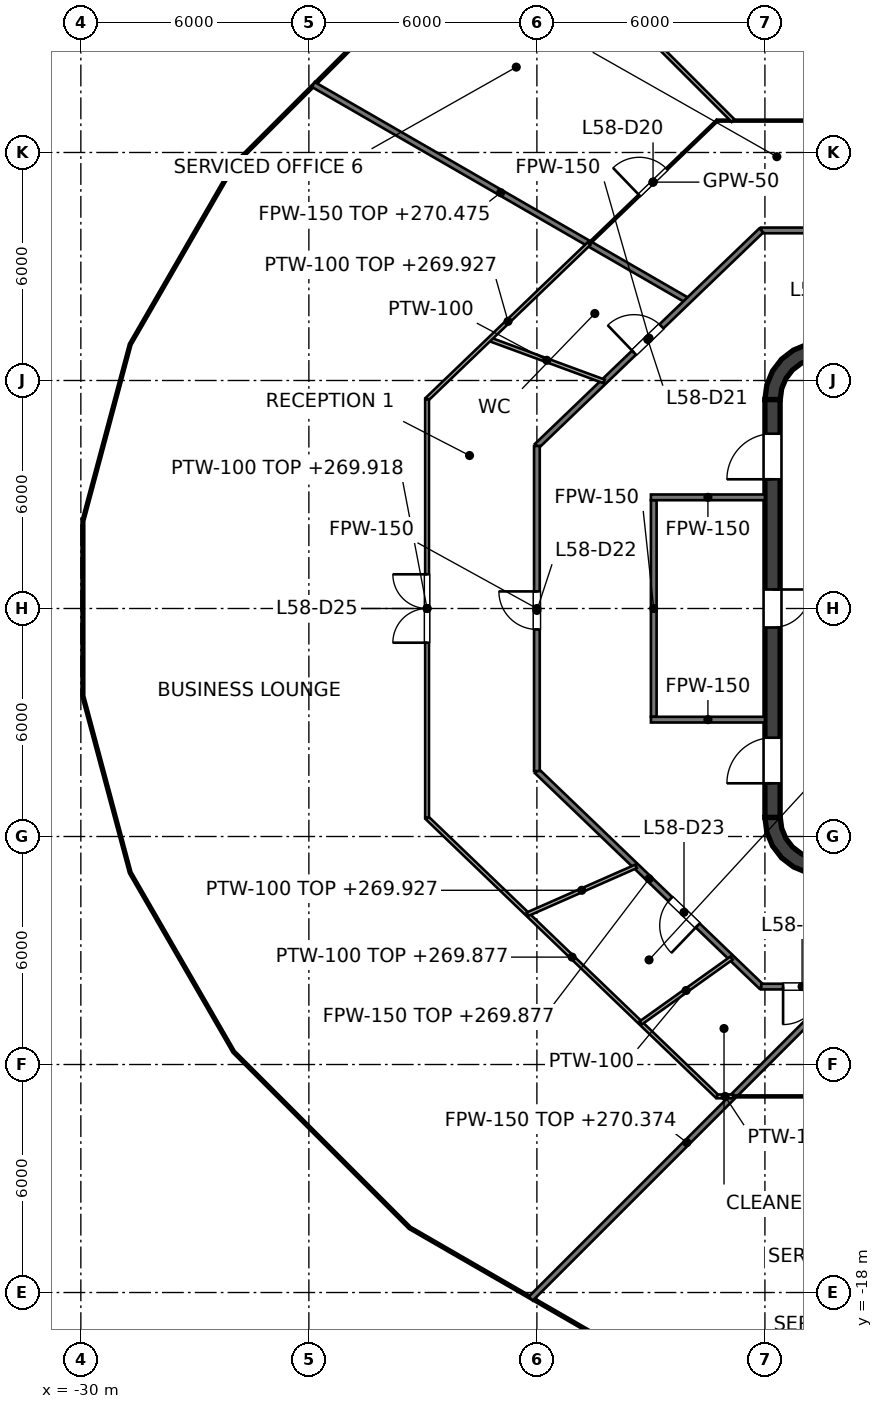
"""IFC4 building model, lengths in metres.
Left out: names, types, materials, properties, quantities, classifications, styles, units other than length and angle.
Written with IfcOpenShell. Run it as: python <this file> out.ifc"""

import sys

from ifc_helpers import new_model, si_unit, direction, frame, frame_2d, origin, place, context, subcontext, project, spatial, polyline, rectangle, outline, extrude, element, fill, save


model = new_model("IFC4")
c1 = context("Model", 3, precision=1e-05, world=origin(), true_north=direction((0.0, 1.0)))
c2 = subcontext(c1, "Body", "Model", "MODEL_VIEW")
j1 = project(units=[si_unit("LENGTHUNIT", "METRE"), si_unit("PLANEANGLEUNIT", "RADIAN")], contexts=[c1])
p1 = place(None, origin())
s1 = spatial("IfcSite", under=j1, at=p1, CompositionType="ELEMENT")
p2 = place(p1, origin())
s2 = spatial("IfcBuilding", under=s1, at=p2, CompositionType="ELEMENT")
p3 = place(p2, frame((0.0, 0.0, 267.0)))
s3 = spatial("IfcBuildingStorey", under=s2, at=p3, CompositionType="ELEMENT", Elevation=267.0)
p4 = place(p3, frame((-11.8, -5.5, 0.0), z_axis=(0.0, 0.0, 1.0), x_axis=(0.0, 1.0, 0.0)))
e1 = element("IfcWall", 1, at=p4, inside=s3, PredefinedType="SHEAR", context=c2, shape_type="SweptSolid", body=[
    extrude(rectangle(XDim=11.0, YDim=0.4, at=frame_2d((5.5, 0.0))), origin(), (0.0, 0.0, 1.0), 4.0),
])
p5 = place(p4, frame((5.0, 0.0, 0.0)))
e2 = element("IfcOpeningElement", 2, at=p5, cuts=e1, PredefinedType="OPENING", context=c2, shape_type="SweptSolid", body=[
    extrude(rectangle(XDim=1.0, YDim=2.1, at=frame_2d((0.5, 1.05))), frame((0.0, 0.2, 0.0), z_axis=(0.0, -1.0, 0.0), x_axis=(1.0, 0.0, 0.0)), (0.0, 0.0, 1.0), 0.4),
])
p6 = place(p4, frame((0.9, 0.0, 0.0)))
e3 = element("IfcOpeningElement", 3, at=p6, cuts=e1, PredefinedType="OPENING", context=c2, shape_type="SweptSolid", body=[
    extrude(rectangle(XDim=1.2, YDim=2.1, at=frame_2d((0.6, 1.05))), frame((0.0, 0.2, 0.0), z_axis=(0.0, -1.0, 0.0), x_axis=(1.0, 0.0, 0.0)), (0.0, 0.0, 1.0), 0.4),
])
p7 = place(p4, frame((8.9, 0.0, 0.0)))
e4 = element("IfcOpeningElement", 4, at=p7, cuts=e1, PredefinedType="OPENING", context=c2, shape_type="SweptSolid", body=[
    extrude(rectangle(XDim=1.2, YDim=2.1, at=frame_2d((0.6, 1.05))), frame((0.0, 0.2, 0.0), z_axis=(0.0, -1.0, 0.0), x_axis=(1.0, 0.0, 0.0)), (0.0, 0.0, 1.0), 0.4),
])
p8 = place(p3, origin())
e5 = element("IfcWall", 5, at=p8, inside=s3, PredefinedType="SHEAR", context=c2, shape_type="SweptSolid", body=[
    extrude(outline(polyline([(-12.0, 5.5), (-11.596, 5.5), (-11.559, 5.784), (-11.45, 6.048), (-11.275, 6.275), (-11.048, 6.45), (-10.784, 6.559), (-10.5, 6.596), (-10.5, 7.0), (-10.888, 6.949), (-11.25, 6.799), (-11.561, 6.561), (-11.799, 6.25), (-11.949, 5.888), (-12.0, 5.5)])), origin(), (0.0, 0.0, 1.0), 4.0),
])
e6 = element("IfcWall", 6, at=p8, inside=s3, PredefinedType="SHEAR", context=c2, shape_type="SweptSolid", body=[
    extrude(outline(polyline([(-10.5, -7.0), (-10.5, -6.596), (-10.784, -6.559), (-11.048, -6.45), (-11.275, -6.275), (-11.45, -6.048), (-11.559, -5.784), (-11.596, -5.5), (-12.0, -5.5), (-11.949, -5.888), (-11.799, -6.25), (-11.561, -6.561), (-11.25, -6.799), (-10.888, -6.949), (-10.5, -7.0)])), origin(), (0.0, 0.0, 1.0), 4.0),
])
p9 = place(p3, frame((-14.925, -2.85, 0.0), z_axis=(0.0, 0.0, 1.0), x_axis=(0.0, 1.0, 0.0)))
e7 = element("IfcWall", 7, at=p9, inside=s3, PredefinedType="PARTITIONING", context=c2, shape_type="SweptSolid", body=[
    extrude(rectangle(XDim=5.7, YDim=0.15, at=frame_2d((2.85, 0.0))), origin(), (0.0, 0.0, 1.0), 2.918),
])
for number, where, z_axis, x_axis in (
    (8, (-15.0, 2.925, 0.0), (0.0, 0.0, 1.0), (1.0, 0.0, 0.0)),
    (9, (-15.0, -2.925, 0.0), (0.0, 0.0, 1.0), (1.0, 0.0, 0.0)),
):
    element("IfcWall", number, at=place(p3, frame(where, z_axis=z_axis, x_axis=x_axis)), inside=s3, PredefinedType="PARTITIONING", context=c2, shape_type="SweptSolid", body=[
        extrude(rectangle(XDim=3.0, YDim=0.15, at=frame_2d((1.5, 0.0))), origin(), (0.0, 0.0, 1.0), 2.918),
    ])
p10 = place(p3, frame((-18.0, -4.278, 0.0), z_axis=(0.0, 0.0, 1.0), x_axis=(0.721290181137, -0.692633001376, 0.0)))
e10 = element("IfcWall", 10, at=p10, inside=s3, PredefinedType="PARTITIONING", context=c2, shape_type="SweptSolid", body=[
    extrude(rectangle(XDim=8.187, YDim=0.15, at=frame_2d((4.094, 0.0))), origin(), (0.0, 0.0, 1.0), 2.877),
])
p11 = place(p10, frame((4.866, 0.0, 0.0)))
e11 = element("IfcOpeningElement", 11, at=p11, cuts=e10, PredefinedType="OPENING", context=c2, shape_type="SweptSolid", body=[
    extrude(rectangle(XDim=1.0, YDim=2.1, at=frame_2d((0.5, 1.05))), frame((0.0, 0.075, 0.0), z_axis=(0.0, -1.0, 0.0), x_axis=(1.0, 0.0, 0.0)), (0.0, 0.0, 1.0), 0.15),
])
p12 = place(p3, frame((-23.883, 13.789, 0.0), z_axis=(0.0, 0.0, 1.0), x_axis=(0.866026665955, -0.499997813851, 0.0)))
e12 = element("IfcWall", 12, at=p12, inside=s3, PredefinedType="PARTITIONING", context=c2, shape_type="SweptSolid", body=[
    extrude(rectangle(XDim=11.384, YDim=0.15, at=frame_2d((5.692, 0.0))), origin(), (0.0, 0.0, 1.0), 3.475),
])
p13 = place(p3, frame((-12.095, -9.949, 0.0), z_axis=(0.0, 0.0, 1.0), x_axis=(1.0, 0.0, 0.0)))
e13 = element("IfcWall", 13, at=p13, inside=s3, PredefinedType="PARTITIONING", context=c2, shape_type="SweptSolid", body=[
    extrude(rectangle(XDim=24.19, YDim=0.15, at=frame_2d((12.095, 0.0))), origin(), (0.0, 0.0, 1.0), 2.877),
])
p14 = place(p13, frame((0.573, 0.0, 0.0)))
e14 = element("IfcOpeningElement", 14, at=p14, cuts=e13, PredefinedType="OPENING", context=c2, shape_type="SweptSolid", body=[
    extrude(rectangle(XDim=1.0, YDim=2.1, at=frame_2d((0.5, 1.05))), frame((0.0, 0.075, 0.0), z_axis=(0.0, -1.0, 0.0), x_axis=(1.0, 0.0, 0.0)), (0.0, 0.0, 1.0), 0.15),
])
p15 = place(p13, frame((5.966, 0.0, 0.0)))
e15 = element("IfcOpeningElement", 15, at=p15, cuts=e13, PredefinedType="OPENING", context=c2, shape_type="SweptSolid", body=[
    extrude(rectangle(XDim=1.0, YDim=2.1, at=frame_2d((0.5, 1.05))), frame((0.0, 0.075, 0.0), z_axis=(0.0, -1.0, 0.0), x_axis=(1.0, 0.0, 0.0)), (0.0, 0.0, 1.0), 0.15),
])
p16 = place(p13, frame((13.812, 0.0, 0.0)))
e16 = element("IfcOpeningElement", 16, at=p16, cuts=e13, PredefinedType="OPENING", context=c2, shape_type="SweptSolid", body=[
    extrude(rectangle(XDim=1.0, YDim=2.1, at=frame_2d((0.5, 1.05))), frame((0.0, 0.075, 0.0), z_axis=(0.0, -1.0, 0.0), x_axis=(1.0, 0.0, 0.0)), (0.0, 0.0, 1.0), 0.15),
])
p17 = place(p13, frame((19.879, 0.0, 0.0)))
e17 = element("IfcOpeningElement", 17, at=p17, cuts=e13, PredefinedType="OPENING", context=c2, shape_type="SweptSolid", body=[
    extrude(rectangle(XDim=1.0, YDim=2.1, at=frame_2d((0.5, 1.05))), frame((0.0, 0.075, 0.0), z_axis=(0.0, -1.0, 0.0), x_axis=(1.0, 0.0, 0.0)), (0.0, 0.0, 1.0), 0.15),
])
p18 = place(p3, frame((-12.095, 9.949, 0.0), z_axis=(0.0, 0.0, 1.0), x_axis=(1.0, 0.0, 0.0)))
e18 = element("IfcWall", 18, at=p18, inside=s3, PredefinedType="PARTITIONING", context=c2, shape_type="SweptSolid", body=[
    extrude(rectangle(XDim=24.19, YDim=0.15, at=frame_2d((12.095, 0.0))), origin(), (0.0, 0.0, 1.0), 2.927),
])
p19 = place(p18, frame((9.784, 0.0, 0.0)))
e19 = element("IfcOpeningElement", 19, at=p19, cuts=e18, PredefinedType="OPENING", context=c2, shape_type="SweptSolid", body=[
    extrude(rectangle(XDim=1.0, YDim=2.1, at=frame_2d((0.5, 1.05))), frame((0.0, 0.075, 0.0), z_axis=(0.0, -1.0, 0.0), x_axis=(1.0, 0.0, 0.0)), (0.0, 0.0, 1.0), 0.15),
])
p20 = place(p18, frame((5.56, 0.0, 0.0)))
e20 = element("IfcOpeningElement", 20, at=p20, cuts=e18, PredefinedType="OPENING", context=c2, shape_type="SweptSolid", body=[
    extrude(rectangle(XDim=1.0, YDim=2.1, at=frame_2d((0.5, 1.05))), frame((0.0, 0.075, 0.0), z_axis=(0.0, -1.0, 0.0), x_axis=(1.0, 0.0, 0.0)), (0.0, 0.0, 1.0), 0.15),
])
p21 = place(p18, frame((1.322, 0.0, 0.0)))
e21 = element("IfcOpeningElement", 21, at=p21, cuts=e18, PredefinedType="OPENING", context=c2, shape_type="SweptSolid", body=[
    extrude(rectangle(XDim=1.0, YDim=2.1, at=frame_2d((0.5, 1.05))), frame((0.0, 0.075, 0.0), z_axis=(0.0, -1.0, 0.0), x_axis=(1.0, 0.0, 0.0)), (0.0, 0.0, 1.0), 0.15),
])
p22 = place(p18, frame((19.104, 0.0, 0.0)))
e22 = element("IfcOpeningElement", 22, at=p22, cuts=e18, PredefinedType="OPENING", context=c2, shape_type="SweptSolid", body=[
    extrude(rectangle(XDim=1.0, YDim=2.1, at=frame_2d((0.5, 1.05))), frame((0.0, 0.075, 0.0), z_axis=(0.0, -1.0, 0.0), x_axis=(1.0, 0.0, 0.0)), (0.0, 0.0, 1.0), 0.15),
])
p23 = place(p18, frame((14.129, 0.0, 0.0)))
e23 = element("IfcOpeningElement", 23, at=p23, cuts=e18, PredefinedType="OPENING", context=c2, shape_type="SweptSolid", body=[
    extrude(rectangle(XDim=1.0, YDim=2.1, at=frame_2d((0.5, 1.05))), frame((0.0, 0.075, 0.0), z_axis=(0.0, -1.0, 0.0), x_axis=(1.0, 0.0, 0.0)), (0.0, 0.0, 1.0), 0.15),
])
p24 = place(p3, frame((-18.0, 4.278, 0.0), z_axis=(0.0, 0.0, 1.0), x_axis=(0.721260976692, 0.69266341285, 0.0)))
e24 = element("IfcWall", 24, at=p24, inside=s3, PredefinedType="PARTITIONING", context=c2, shape_type="SweptSolid", body=[
    extrude(rectangle(XDim=8.187, YDim=0.15, at=frame_2d((4.094, 0.0))), origin(), (0.0, 0.0, 1.0), 2.918),
])
p25 = place(p24, frame((3.544, 0.0, 0.0)))
e25 = element("IfcOpeningElement", 25, at=p25, cuts=e24, PredefinedType="OPENING", context=c2, shape_type="SweptSolid", body=[
    extrude(rectangle(XDim=1.0, YDim=2.1, at=frame_2d((0.5, 1.05))), frame((0.0, 0.075, 0.0), z_axis=(0.0, -1.0, 0.0), x_axis=(1.0, 0.0, 0.0)), (0.0, 0.0, 1.0), 0.15),
])
p26 = place(p3, frame((-18.16, -18.16, 0.0), z_axis=(0.0, 0.0, 1.0), x_axis=(0.707106781187, 0.707106781187, 0.0)))
e26 = element("IfcWall", 26, at=p26, inside=s3, PredefinedType="PARTITIONING", context=c2, shape_type="SweptSolid", body=[
    extrude(rectangle(XDim=11.612, YDim=0.15, at=frame_2d((5.806, 0.0))), origin(), (0.0, 0.0, 1.0), 3.374),
])
p27 = place(p3, frame((-18.0, -4.278, 0.0), z_axis=(0.0, 0.0, 1.0), x_axis=(0.0, 1.0, 0.0)))
e27 = element("IfcWall", 27, at=p27, inside=s3, PredefinedType="PARTITIONING", context=c2, shape_type="SweptSolid", body=[
    extrude(rectangle(XDim=8.556, YDim=0.15, at=frame_2d((4.278, 0.0))), origin(), (0.0, 0.0, 1.0), 2.918),
])
p28 = place(p27, frame((3.728, 0.0, 0.0)))
e28 = element("IfcOpeningElement", 28, at=p28, cuts=e27, PredefinedType="OPENING", context=c2, shape_type="SweptSolid", body=[
    extrude(rectangle(XDim=1.0, YDim=2.1, at=frame_2d((0.5, 1.05))), frame((0.0, 0.075, 0.0), z_axis=(0.0, -1.0, 0.0), x_axis=(1.0, 0.0, 0.0)), (0.0, 0.0, 1.0), 0.15),
])
p29 = place(p3, frame((-12.839, -12.839, 0.0), z_axis=(0.0, 0.0, 1.0), x_axis=(1.0, 0.0, 0.0)))
e29 = element("IfcWall", 29, at=p29, inside=s3, PredefinedType="PARTITIONING", context=c2, shape_type="SweptSolid", body=[
    extrude(rectangle(XDim=20.251, YDim=0.05, at=frame_2d((10.125, 0.0))), origin(), (0.0, 0.0, 1.0), 2.877),
])
p30 = place(p29, frame((4.149, 0.0, 0.0)))
e30 = element("IfcOpeningElement", 30, at=p30, cuts=e29, PredefinedType="OPENING", context=c2, shape_type="SweptSolid", body=[
    extrude(rectangle(XDim=1.0, YDim=2.1, at=frame_2d((0.5, 1.05))), frame((0.0, 0.025, 0.0), z_axis=(0.0, -1.0, 0.0), x_axis=(1.0, 0.0, 0.0)), (0.0, 0.0, 1.0), 0.05),
])
p31 = place(p29, frame((15.15, 0.0, 0.0)))
e31 = element("IfcOpeningElement", 31, at=p31, cuts=e29, PredefinedType="OPENING", context=c2, shape_type="SweptSolid", body=[
    extrude(rectangle(XDim=1.0, YDim=2.1, at=frame_2d((0.5, 1.05))), frame((0.0, 0.025, 0.0), z_axis=(0.0, -1.0, 0.0), x_axis=(1.0, 0.0, 0.0)), (0.0, 0.0, 1.0), 0.05),
])
p32 = place(p3, frame((-13.258, 12.839, 0.0), z_axis=(0.0, 0.0, 1.0), x_axis=(1.0, 0.0, 0.0)))
e32 = element("IfcWall", 32, at=p32, inside=s3, PredefinedType="PARTITIONING", context=c2, shape_type="SweptSolid", body=[
    extrude(rectangle(XDim=13.258, YDim=0.05, at=frame_2d((6.629, 0.0))), origin(), (0.0, 0.0, 1.0), 2.927),
])
p33 = place(p32, frame((11.038, 0.0, 0.0)))
e33 = element("IfcOpeningElement", 33, at=p33, cuts=e32, PredefinedType="OPENING", context=c2, shape_type="SweptSolid", body=[
    extrude(rectangle(XDim=1.0, YDim=2.1, at=frame_2d((0.5, 1.05))), frame((0.0, 0.025, 0.0), z_axis=(0.0, -1.0, 0.0), x_axis=(1.0, 0.0, 0.0)), (0.0, 0.0, 1.0), 0.05),
])
p34 = place(p32, frame((4.985, 0.0, 0.0)))
e34 = element("IfcOpeningElement", 34, at=p34, cuts=e32, PredefinedType="OPENING", context=c2, shape_type="SweptSolid", body=[
    extrude(rectangle(XDim=1.0, YDim=2.1, at=frame_2d((0.5, 1.05))), frame((0.0, 0.025, 0.0), z_axis=(0.0, -1.0, 0.0), x_axis=(1.0, 0.0, 0.0)), (0.0, 0.0, 1.0), 0.05),
])
p35 = place(p3, frame((-16.629, 9.601, 0.0), z_axis=(0.0, 0.0, 1.0), x_axis=(0.721171224294, 0.692756858681, 0.0)))
e35 = element("IfcWall", 35, at=p35, inside=s3, PredefinedType="PARTITIONING", context=c2, shape_type="SweptSolid", body=[
    extrude(rectangle(XDim=4.674, YDim=0.05, at=frame_2d((2.337, 0.0))), origin(), (0.0, 0.0, 1.0), 2.927),
])
p36 = place(p35, frame((1.837, 0.0, 0.0)))
e36 = element("IfcOpeningElement", 36, at=p36, cuts=e35, PredefinedType="OPENING", context=c2, shape_type="SweptSolid", body=[
    extrude(rectangle(XDim=1.0, YDim=2.1, at=frame_2d((0.5, 1.05))), frame((0.0, 0.025, 0.0), z_axis=(0.0, -1.0, 0.0), x_axis=(1.0, 0.0, 0.0)), (0.0, 0.0, 1.0), 0.05),
])
p37 = place(p3, frame((-18.16, 18.16, 0.0), z_axis=(0.0, 0.0, 1.0), x_axis=(0.707106781187, -0.707106781187, 0.0)))
e37 = element("IfcWall", 37, at=p37, inside=s3, PredefinedType="PARTITIONING", context=c2, shape_type="SweptSolid", body=[
    extrude(rectangle(XDim=7.525, YDim=0.1, at=frame_2d((3.762, 0.0))), origin(), (0.0, 0.0, 1.0), 3.424),
])
p38 = place(p3, frame((-20.89, -5.509, 0.0), z_axis=(0.0, 0.0, 1.0), x_axis=(0.721243919182, -0.692681174166, 0.0)))
e38 = element("IfcWall", 38, at=p38, inside=s3, PredefinedType="PARTITIONING", context=c2, shape_type="SweptSolid", body=[
    extrude(rectangle(XDim=10.582, YDim=0.1, at=frame_2d((5.291, 0.0))), origin(), (0.0, 0.0, 1.0), 2.877),
])
p39 = place(p3, frame((-19.247, 7.086, 0.0), z_axis=(0.0, 0.0, 1.0), x_axis=(0.938441676653, -0.345437721625, 0.0)))
e39 = element("IfcWall", 39, at=p39, inside=s3, PredefinedType="PARTITIONING", context=c2, shape_type="SweptSolid", body=[
    extrude(rectangle(XDim=3.213, YDim=0.1, at=frame_2d((1.606, 0.0))), origin(), (0.0, 0.0, 1.0), 3.85),
])
p40 = place(p3, frame((-13.258, -12.839, 0.0), z_axis=(0.0, 0.0, 1.0), x_axis=(1.0, 0.0, 0.0)))
e40 = element("IfcWall", 40, at=p40, inside=s3, PredefinedType="PARTITIONING", context=c2, shape_type="SweptSolid", body=[
    extrude(rectangle(XDim=0.419, YDim=0.1, at=frame_2d((0.209, 0.0))), origin(), (0.0, 0.0, 1.0), 3.85),
])
p41 = place(p3, frame((-18.249, -8.046, 0.0), z_axis=(0.0, 0.0, 1.0), x_axis=(0.915015337029, 0.403419053841, 0.0)))
e41 = element("IfcWall", 41, at=p41, inside=s3, PredefinedType="PARTITIONING", context=c2, shape_type="SweptSolid", body=[
    extrude(rectangle(XDim=3.126, YDim=0.1, at=frame_2d((1.563, 0.0))), origin(), (0.0, 0.0, 1.0), 2.927),
])
p42 = place(p3, frame((-15.27, -10.907, 0.0), z_axis=(0.0, 0.0, 1.0), x_axis=(0.813789563909, 0.581159655923, 0.0)))
e42 = element("IfcWall", 42, at=p42, inside=s3, PredefinedType="PARTITIONING", context=c2, shape_type="SweptSolid", body=[
    extrude(rectangle(XDim=2.941, YDim=0.1, at=frame_2d((1.47, 0.0))), origin(), (0.0, 0.0, 1.0), 3.85),
])
p43 = place(p3, frame((-20.89, 5.509, 0.0), z_axis=(0.0, 0.0, 1.0), x_axis=(0.721200651506, 0.69272622317, 0.0)))
e43 = element("IfcWall", 43, at=p43, inside=s3, PredefinedType="PARTITIONING", context=c2, shape_type="SweptSolid", body=[
    extrude(rectangle(XDim=5.907, YDim=0.1, at=frame_2d((2.954, 0.0))), origin(), (0.0, 0.0, 1.0), 2.927),
])
p44 = place(p3, frame((-20.89, -5.509, 0.0), z_axis=(0.0, 0.0, 1.0), x_axis=(0.0, 1.0, 0.0)))
e44 = element("IfcWall", 44, at=p44, inside=s3, PredefinedType="PARTITIONING", context=c2, shape_type="SweptSolid", body=[
    extrude(rectangle(XDim=11.018, YDim=0.1, at=frame_2d((5.509, 0.0))), origin(), (0.0, 0.0, 1.0), 2.918),
])
p45 = place(p44, frame((4.609, 0.0, 0.0)))
e45 = element("IfcOpeningElement", 45, at=p45, cuts=e44, PredefinedType="OPENING", context=c2, shape_type="SweptSolid", body=[
    extrude(rectangle(XDim=1.8, YDim=2.1, at=frame_2d((0.9, 1.05))), frame((0.0, 0.05, 0.0), z_axis=(0.0, -1.0, 0.0), x_axis=(1.0, 0.0, 0.0)), (0.0, 0.0, 1.0), 0.1),
])
p46 = place(p5, origin())
e46 = element("IfcDoor", 46, at=p46, inside=s3, OperationType="SINGLE_SWING_RIGHT", PredefinedType="DOOR", context=c2, shape_type="SweptSolid", body=[
    extrude(rectangle(XDim=1.0, YDim=2.1, at=frame_2d((0.5, 1.05))), frame((0.0, 0.025, 0.0), z_axis=(0.0, -1.0, 0.0), x_axis=(1.0, 0.0, 0.0)), (0.0, 0.0, 1.0), 0.05),
])
fill(e2, e46)
p47 = place(p6, origin())
e47 = element("IfcDoor", 47, at=p47, inside=s3, OperationType="SINGLE_SWING_LEFT", PredefinedType="DOOR", context=c2, shape_type="SweptSolid", body=[
    extrude(rectangle(XDim=1.2, YDim=2.1, at=frame_2d((0.6, 1.05))), frame((0.0, 0.025, 0.0), z_axis=(0.0, -1.0, 0.0), x_axis=(1.0, 0.0, 0.0)), (0.0, 0.0, 1.0), 0.05),
])
fill(e3, e47)
p48 = place(p7, origin())
e48 = element("IfcDoor", 48, at=p48, inside=s3, OperationType="SINGLE_SWING_LEFT", PredefinedType="DOOR", context=c2, shape_type="SweptSolid", body=[
    extrude(rectangle(XDim=1.2, YDim=2.1, at=frame_2d((0.6, 1.05))), frame((0.0, 0.025, 0.0), z_axis=(0.0, -1.0, 0.0), x_axis=(1.0, 0.0, 0.0)), (0.0, 0.0, 1.0), 0.05),
])
fill(e4, e48)
p49 = place(p36, origin())
e49 = element("IfcDoor", 49, at=p49, inside=s3, OperationType="SINGLE_SWING_LEFT", PredefinedType="DOOR", context=c2, shape_type="SweptSolid", body=[
    extrude(rectangle(XDim=1.0, YDim=2.1, at=frame_2d((0.5, 1.05))), frame((0.0, 0.025, 0.0), z_axis=(0.0, -1.0, 0.0), x_axis=(1.0, 0.0, 0.0)), (0.0, 0.0, 1.0), 0.05),
])
fill(e36, e49)
p50 = place(p25, origin())
e50 = element("IfcDoor", 50, at=p50, inside=s3, OperationType="SINGLE_SWING_LEFT", PredefinedType="DOOR", context=c2, shape_type="SweptSolid", body=[
    extrude(rectangle(XDim=1.0, YDim=2.1, at=frame_2d((0.5, 1.05))), frame((0.0, 0.025, 0.0), z_axis=(0.0, -1.0, 0.0), x_axis=(1.0, 0.0, 0.0)), (0.0, 0.0, 1.0), 0.05),
])
fill(e25, e50)
p51 = place(p28, origin())
e51 = element("IfcDoor", 51, at=p51, inside=s3, OperationType="SINGLE_SWING_RIGHT", PredefinedType="DOOR", context=c2, shape_type="SweptSolid", body=[
    extrude(rectangle(XDim=1.0, YDim=2.1, at=frame_2d((0.5, 1.05))), frame((0.0, 0.025, 0.0), z_axis=(0.0, -1.0, 0.0), x_axis=(1.0, 0.0, 0.0)), (0.0, 0.0, 1.0), 0.05),
])
fill(e28, e51)
p52 = place(p11, origin())
e52 = element("IfcDoor", 52, at=p52, inside=s3, OperationType="SINGLE_SWING_RIGHT", PredefinedType="DOOR", context=c2, shape_type="SweptSolid", body=[
    extrude(rectangle(XDim=1.0, YDim=2.1, at=frame_2d((0.5, 1.05))), frame((0.0, 0.025, 0.0), z_axis=(0.0, -1.0, 0.0), x_axis=(1.0, 0.0, 0.0)), (0.0, 0.0, 1.0), 0.05),
])
fill(e11, e52)
p53 = place(p14, origin())
e53 = element("IfcDoor", 53, at=p53, inside=s3, OperationType="SINGLE_SWING_LEFT", PredefinedType="DOOR", context=c2, shape_type="SweptSolid", body=[
    extrude(rectangle(XDim=1.0, YDim=2.1, at=frame_2d((0.5, 1.05))), frame((0.0, 0.025, 0.0), z_axis=(0.0, -1.0, 0.0), x_axis=(1.0, 0.0, 0.0)), (0.0, 0.0, 1.0), 0.05),
])
fill(e14, e53)
p54 = place(p45, origin())
e54 = element("IfcDoor", 54, at=p54, inside=s3, OperationType="DOUBLE_DOOR_SINGLE_SWING", PredefinedType="DOOR", context=c2, shape_type="SweptSolid", body=[
    extrude(rectangle(XDim=1.8, YDim=2.1, at=frame_2d((0.9, 1.05))), frame((0.0, 0.025, 0.0), z_axis=(0.0, -1.0, 0.0), x_axis=(1.0, 0.0, 0.0)), (0.0, 0.0, 1.0), 0.05),
])
fill(e45, e54)
save(model, sys.argv[1])
